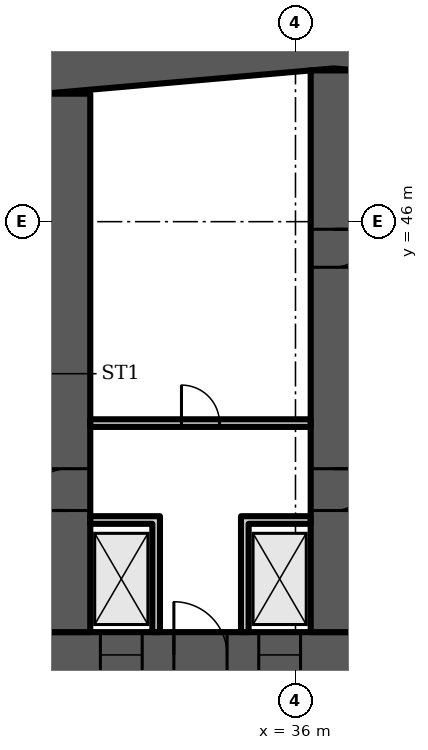
"""IFC4 building model, lengths in metres.
Left out: names, types, materials, properties, quantities, classifications, styles, units other than length and angle.
Written with IfcOpenShell. Run it as: python <this file> out.ifc"""

import sys

from ifc_helpers import new_model, si_unit, direction, frame, frame_2d, origin, place, context, subcontext, project, spatial, polyline, rectangle, outline, extrude, element, fill, save


model = new_model("IFC4")
c1 = context("Model", 3, precision=1e-05, world=origin(), true_north=direction((0.0, 1.0)))
c2 = subcontext(c1, "Body", "Model", "MODEL_VIEW")
j1 = project(units=[si_unit("LENGTHUNIT", "METRE"), si_unit("PLANEANGLEUNIT", "RADIAN")], contexts=[c1])
p1 = place(None, origin())
s1 = spatial("IfcSite", under=j1, at=p1, CompositionType="ELEMENT")
p2 = place(p1, origin())
s2 = spatial("IfcBuilding", under=s1, at=p2, CompositionType="ELEMENT")
p3 = place(p2, frame((0.0, 0.0, 88.3)))
s3 = spatial("IfcBuildingStorey", under=s2, at=p3, CompositionType="ELEMENT", Elevation=88.3)
p4 = place(p3, frame((0.0, 0.0, -0.0)))
e1 = element("IfcWall", 1, at=p4, inside=s3, PredefinedType="SHEAR", context=c2, shape_type="SweptSolid", body=[
    extrude(outline(polyline([(9.0, 47.583), (37.0, 50.032), (65.0, 47.583), (65.0, 48.787), (37.0, 51.237), (9.0, 48.787), (9.0, 47.583)])), origin(), (0.0, 0.0, 1.0), 3.6),
])
p5 = place(p3, frame((9.0, 34.6, 0.0), z_axis=(0.0, 0.0, 1.0), x_axis=(1.0, 0.0, 0.0)))
e2 = element("IfcWall", 2, at=p5, inside=s3, PredefinedType="SHEAR", context=c2, shape_type="SweptSolid", body=[
    extrude(rectangle(XDim=56.0, YDim=1.2, at=frame_2d((28.0, 0.0))), origin(), (0.0, 0.0, 1.0), 3.6),
])
p6 = place(p5, frame((2.0, 0.0, 0.0)))
e3 = element("IfcOpeningElement", 3, at=p6, cuts=e2, PredefinedType="OPENING", context=c2, shape_type="SweptSolid", body=[
    extrude(rectangle(XDim=1.0, YDim=2.1, at=frame_2d((0.5, 1.05))), frame((0.0, 0.61, 0.0), z_axis=(0.0, -1.0, 0.0), x_axis=(1.0, 0.0, 0.0)), (0.0, 0.0, 1.0), 1.22),
])
p7 = place(p5, frame((4.6, 0.0, 0.0)))
e4 = element("IfcOpeningElement", 4, at=p7, cuts=e2, PredefinedType="OPENING", context=c2, shape_type="SweptSolid", body=[
    extrude(rectangle(XDim=1.0, YDim=2.1, at=frame_2d((0.5, 1.05))), frame((0.0, 0.61, 0.0), z_axis=(0.0, -1.0, 0.0), x_axis=(1.0, 0.0, 0.0)), (0.0, 0.0, 1.0), 1.22),
])
p8 = place(p5, frame((7.867, 0.0, 0.0)))
e5 = element("IfcOpeningElement", 5, at=p8, cuts=e2, PredefinedType="OPENING", context=c2, shape_type="SweptSolid", body=[
    extrude(rectangle(XDim=1.1, YDim=2.1, at=frame_2d((0.55, 1.05))), frame((0.0, 0.61, 0.0), z_axis=(0.0, -1.0, 0.0), x_axis=(1.0, 0.0, 0.0)), (0.0, 0.0, 1.0), 1.22),
])
p9 = place(p5, frame((12.033, 0.0, 0.0)))
e6 = element("IfcOpeningElement", 6, at=p9, cuts=e2, PredefinedType="OPENING", context=c2, shape_type="SweptSolid", body=[
    extrude(rectangle(XDim=1.1, YDim=2.1, at=frame_2d((0.55, 1.05))), frame((0.0, 0.61, 0.0), z_axis=(0.0, -1.0, 0.0), x_axis=(1.0, 0.0, 0.0)), (0.0, 0.0, 1.0), 1.22),
])
p10 = place(p5, frame((9.8, 0.0, 0.0)))
e7 = element("IfcOpeningElement", 7, at=p10, cuts=e2, PredefinedType="OPENING", context=c2, shape_type="SweptSolid", body=[
    extrude(rectangle(XDim=1.4, YDim=2.1, at=frame_2d((0.7, 1.05))), frame((0.0, 0.61, 0.0), z_axis=(0.0, -1.0, 0.0), x_axis=(1.0, 0.0, 0.0)), (0.0, 0.0, 1.0), 1.22),
])
p11 = place(p5, frame((14.65, 0.0, 0.0)))
e8 = element("IfcOpeningElement", 8, at=p11, cuts=e2, PredefinedType="OPENING", context=c2, shape_type="SweptSolid", body=[
    extrude(rectangle(XDim=1.2, YDim=2.1, at=frame_2d((0.6, 1.05))), frame((0.0, 0.61, 0.0), z_axis=(0.0, -1.0, 0.0), x_axis=(1.0, 0.0, 0.0)), (0.0, 0.0, 1.0), 1.22),
])
p12 = place(p5, frame((21.867, 0.0, 0.0)))
e9 = element("IfcOpeningElement", 9, at=p12, cuts=e2, PredefinedType="OPENING", context=c2, shape_type="SweptSolid", body=[
    extrude(rectangle(XDim=1.1, YDim=2.1, at=frame_2d((0.55, 1.05))), frame((0.0, 0.61, 0.0), z_axis=(0.0, -1.0, 0.0), x_axis=(1.0, 0.0, 0.0)), (0.0, 0.0, 1.0), 1.22),
])
p13 = place(p5, frame((26.033, 0.0, 0.0)))
e10 = element("IfcOpeningElement", 10, at=p13, cuts=e2, PredefinedType="OPENING", context=c2, shape_type="SweptSolid", body=[
    extrude(rectangle(XDim=1.1, YDim=2.1, at=frame_2d((0.55, 1.05))), frame((0.0, 0.61, 0.0), z_axis=(0.0, -1.0, 0.0), x_axis=(1.0, 0.0, 0.0)), (0.0, 0.0, 1.0), 1.22),
])
p14 = place(p5, frame((23.8, 0.0, 0.0)))
e11 = element("IfcOpeningElement", 11, at=p14, cuts=e2, PredefinedType="OPENING", context=c2, shape_type="SweptSolid", body=[
    extrude(rectangle(XDim=1.4, YDim=2.1, at=frame_2d((0.7, 1.05))), frame((0.0, 0.61, 0.0), z_axis=(0.0, -1.0, 0.0), x_axis=(1.0, 0.0, 0.0)), (0.0, 0.0, 1.0), 1.22),
])
p15 = place(p5, frame((28.867, 0.0, 0.0)))
e12 = element("IfcOpeningElement", 12, at=p15, cuts=e2, PredefinedType="OPENING", context=c2, shape_type="SweptSolid", body=[
    extrude(rectangle(XDim=1.1, YDim=2.1, at=frame_2d((0.55, 1.05))), frame((0.0, 0.61, 0.0), z_axis=(0.0, -1.0, 0.0), x_axis=(1.0, 0.0, 0.0)), (0.0, 0.0, 1.0), 1.22),
])
p16 = place(p5, frame((33.033, 0.0, 0.0)))
e13 = element("IfcOpeningElement", 13, at=p16, cuts=e2, PredefinedType="OPENING", context=c2, shape_type="SweptSolid", body=[
    extrude(rectangle(XDim=1.1, YDim=2.1, at=frame_2d((0.55, 1.05))), frame((0.0, 0.61, 0.0), z_axis=(0.0, -1.0, 0.0), x_axis=(1.0, 0.0, 0.0)), (0.0, 0.0, 1.0), 1.22),
])
p17 = place(p5, frame((40.15, 0.0, 0.0)))
e14 = element("IfcOpeningElement", 14, at=p17, cuts=e2, PredefinedType="OPENING", context=c2, shape_type="SweptSolid", body=[
    extrude(rectangle(XDim=1.2, YDim=2.1, at=frame_2d((0.6, 1.05))), frame((0.0, 0.61, 0.0), z_axis=(0.0, -1.0, 0.0), x_axis=(1.0, 0.0, 0.0)), (0.0, 0.0, 1.0), 1.22),
])
p18 = place(p5, frame((44.8, 0.0, 0.0)))
e15 = element("IfcOpeningElement", 15, at=p18, cuts=e2, PredefinedType="OPENING", context=c2, shape_type="SweptSolid", body=[
    extrude(rectangle(XDim=1.4, YDim=2.1, at=frame_2d((0.7, 1.05))), frame((0.0, 0.61, 0.0), z_axis=(0.0, -1.0, 0.0), x_axis=(1.0, 0.0, 0.0)), (0.0, 0.0, 1.0), 1.22),
])
p19 = place(p5, frame((49.867, 0.0, 0.0)))
e16 = element("IfcOpeningElement", 16, at=p19, cuts=e2, PredefinedType="OPENING", context=c2, shape_type="SweptSolid", body=[
    extrude(rectangle(XDim=1.1, YDim=2.1, at=frame_2d((0.55, 1.05))), frame((0.0, 0.61, 0.0), z_axis=(0.0, -1.0, 0.0), x_axis=(1.0, 0.0, 0.0)), (0.0, 0.0, 1.0), 1.22),
])
p20 = place(p5, frame((53.5, 0.0, 0.0)))
e17 = element("IfcOpeningElement", 17, at=p20, cuts=e2, PredefinedType="OPENING", context=c2, shape_type="SweptSolid", body=[
    extrude(rectangle(XDim=1.1, YDim=2.1, at=frame_2d((0.55, 1.05))), frame((0.0, 0.61, 0.0), z_axis=(0.0, -1.0, 0.0), x_axis=(1.0, 0.0, 0.0)), (0.0, 0.0, 1.0), 1.22),
])
p21 = place(p5, frame((51.567, 0.0, 0.0)))
e18 = element("IfcOpeningElement", 18, at=p21, cuts=e2, PredefinedType="OPENING", context=c2, shape_type="SweptSolid", body=[
    extrude(rectangle(XDim=1.4, YDim=2.1, at=frame_2d((0.7, 1.05))), frame((0.0, 0.61, 0.0), z_axis=(0.0, -1.0, 0.0), x_axis=(1.0, 0.0, 0.0)), (0.0, 0.0, 1.0), 1.22),
])
p22 = place(p3, frame((30.0, 35.2, 0.0), z_axis=(0.0, 0.0, 1.0), x_axis=(0.0, 1.0, 0.0)))
e19 = element("IfcWall", 19, at=p22, inside=s3, PredefinedType="SHEAR", context=c2, shape_type="SweptSolid", body=[
    extrude(rectangle(XDim=14.168, YDim=1.2, at=frame_2d((7.084, 0.0))), origin(), (0.0, 0.0, 1.0), 3.6),
])
p23 = place(p22, frame((3.2, 0.0, 0.0)))
e20 = element("IfcOpeningElement", 20, at=p23, cuts=e19, PredefinedType="OPENING", context=c2, shape_type="SweptSolid", body=[
    extrude(rectangle(XDim=1.1, YDim=2.1, at=frame_2d((0.55, 1.05))), frame((0.0, 0.61, 0.0), z_axis=(0.0, -1.0, 0.0), x_axis=(1.0, 0.0, 0.0)), (0.0, 0.0, 1.0), 1.22),
])
p24 = place(p3, frame((37.0, 35.2, 0.0), z_axis=(0.0, 0.0, 1.0), x_axis=(0.0, 1.0, 0.0)))
e21 = element("IfcWall", 21, at=p24, inside=s3, PredefinedType="SHEAR", context=c2, shape_type="SweptSolid", body=[
    extrude(rectangle(XDim=14.78, YDim=1.2, at=frame_2d((7.39, 0.0))), origin(), (0.0, 0.0, 1.0), 3.6),
])
p25 = place(p24, frame((3.2, 0.0, 0.0)))
e22 = element("IfcOpeningElement", 22, at=p25, cuts=e21, PredefinedType="OPENING", context=c2, shape_type="SweptSolid", body=[
    extrude(rectangle(XDim=1.1, YDim=2.1, at=frame_2d((0.55, 1.05))), frame((0.0, 0.61, 0.0), z_axis=(0.0, -1.0, 0.0), x_axis=(1.0, 0.0, 0.0)), (0.0, 0.0, 1.0), 1.22),
])
p26 = place(p24, frame((9.6, 0.0, 0.0)))
e23 = element("IfcOpeningElement", 23, at=p26, cuts=e21, PredefinedType="OPENING", context=c2, shape_type="SweptSolid", body=[
    extrude(rectangle(XDim=1.0, YDim=2.1, at=frame_2d((0.5, 1.05))), frame((0.0, 0.61, 0.0), z_axis=(0.0, -1.0, 0.0), x_axis=(1.0, 0.0, 0.0)), (0.0, 0.0, 1.0), 1.22),
])
p27 = place(p3, frame((30.6, 40.7, 0.0), z_axis=(0.0, 0.0, 1.0), x_axis=(1.0, 0.0, 0.0)))
e24 = element("IfcWall", 24, at=p27, inside=s3, PredefinedType="PARTITIONING", context=c2, shape_type="SweptSolid", body=[
    extrude(rectangle(XDim=5.8, YDim=0.2, at=frame_2d((2.9, 0.0))), origin(), (0.0, 0.0, 1.0), 3.15),
])
p28 = place(p27, frame((2.4, 0.0, 0.0)))
e25 = element("IfcOpeningElement", 25, at=p28, cuts=e24, PredefinedType="OPENING", context=c2, shape_type="SweptSolid", body=[
    extrude(rectangle(XDim=1.0, YDim=2.1, at=frame_2d((0.5, 1.05))), frame((0.0, 0.11, 0.0), z_axis=(0.0, -1.0, 0.0), x_axis=(1.0, 0.0, 0.0)), (0.0, 0.0, 1.0), 0.22),
])
p29 = place(p3, frame((0.0, 0.0, -0.0)))
e26 = element("IfcWall", 26, at=p29, inside=s3, PredefinedType="PARTITIONING", context=c2, shape_type="SweptSolid", body=[
    extrude(outline(polyline([(32.233, 38.05), (30.6, 38.05), (30.6, 38.25), (32.233, 38.25), (32.433, 38.25), (32.433, 35.2), (32.233, 35.2), (32.233, 38.05)])), origin(), (0.0, 0.0, 1.0), 3.15),
])
p30 = place(p3, frame((0.0, 0.0, -0.0)))
e27 = element("IfcWall", 27, at=p30, inside=s3, PredefinedType="PARTITIONING", context=c2, shape_type="SweptSolid", body=[
    extrude(outline(polyline([(34.567, 38.25), (34.767, 38.25), (36.4, 38.25), (36.4, 38.05), (34.767, 38.05), (34.767, 35.2), (34.567, 35.2), (34.567, 38.25)])), origin(), (0.0, 0.0, 1.0), 3.15),
])
p31 = place(p12, origin())
e28 = element("IfcDoor", 28, at=p31, inside=s3, OperationType="DOUBLE_DOOR_SLIDING", PredefinedType="DOOR", context=c2, shape_type="SweptSolid", body=[
    extrude(rectangle(XDim=1.1, YDim=2.1, at=frame_2d((0.55, 1.05))), frame((0.0, 0.025, 0.0), z_axis=(0.0, -1.0, 0.0), x_axis=(1.0, 0.0, 0.0)), (0.0, 0.0, 1.0), 0.05),
])
fill(e9, e28)
p32 = place(p13, origin())
e29 = element("IfcDoor", 29, at=p32, inside=s3, OperationType="DOUBLE_DOOR_SLIDING", PredefinedType="DOOR", context=c2, shape_type="SweptSolid", body=[
    extrude(rectangle(XDim=1.1, YDim=2.1, at=frame_2d((0.55, 1.05))), frame((0.0, 0.025, 0.0), z_axis=(0.0, -1.0, 0.0), x_axis=(1.0, 0.0, 0.0)), (0.0, 0.0, 1.0), 0.05),
])
fill(e10, e29)
p33 = place(p14, origin())
e30 = element("IfcDoor", 30, at=p33, inside=s3, OperationType="DOUBLE_DOOR_SINGLE_SWING", PredefinedType="DOOR", context=c2, shape_type="SweptSolid", body=[
    extrude(rectangle(XDim=1.4, YDim=2.1, at=frame_2d((0.7, 1.05))), frame((0.0, 0.025, 0.0), z_axis=(0.0, -1.0, 0.0), x_axis=(1.0, 0.0, 0.0)), (0.0, 0.0, 1.0), 0.05),
])
fill(e11, e30)
p34 = place(p28, origin())
e31 = element("IfcDoor", 31, at=p34, inside=s3, OperationType="SINGLE_SWING_LEFT", PredefinedType="DOOR", context=c2, shape_type="SweptSolid", body=[
    extrude(rectangle(XDim=1.0, YDim=2.1, at=frame_2d((0.5, 1.05))), frame((0.0, 0.025, 0.0), z_axis=(0.0, -1.0, 0.0), x_axis=(1.0, 0.0, 0.0)), (0.0, 0.0, 1.0), 0.05),
])
fill(e25, e31)
p35 = place(p23, origin())
e32 = element("IfcDoor", 32, at=p35, inside=s3, OperationType="SINGLE_SWING_LEFT", PredefinedType="DOOR", context=c2, shape_type="SweptSolid", body=[
    extrude(rectangle(XDim=1.1, YDim=2.1, at=frame_2d((0.55, 1.05))), frame((0.0, 0.025, 0.0), z_axis=(0.0, -1.0, 0.0), x_axis=(1.0, 0.0, 0.0)), (0.0, 0.0, 1.0), 0.05),
])
fill(e20, e32)
p36 = place(p25, origin())
e33 = element("IfcDoor", 33, at=p36, inside=s3, OperationType="SINGLE_SWING_RIGHT", PredefinedType="DOOR", context=c2, shape_type="SweptSolid", body=[
    extrude(rectangle(XDim=1.1, YDim=2.1, at=frame_2d((0.55, 1.05))), frame((0.0, 0.025, 0.0), z_axis=(0.0, -1.0, 0.0), x_axis=(1.0, 0.0, 0.0)), (0.0, 0.0, 1.0), 0.05),
])
fill(e22, e33)
p37 = place(p26, origin())
e34 = element("IfcDoor", 34, at=p37, inside=s3, OperationType="SINGLE_SWING_RIGHT", PredefinedType="DOOR", context=c2, shape_type="SweptSolid", body=[
    extrude(rectangle(XDim=1.0, YDim=2.1, at=frame_2d((0.5, 1.05))), frame((0.0, 0.6, 0.0), z_axis=(0.0, -1.0, 0.0), x_axis=(1.0, 0.0, 0.0)), (0.0, 0.0, 1.0), 1.199),
])
fill(e23, e34)
save(model, sys.argv[1])
